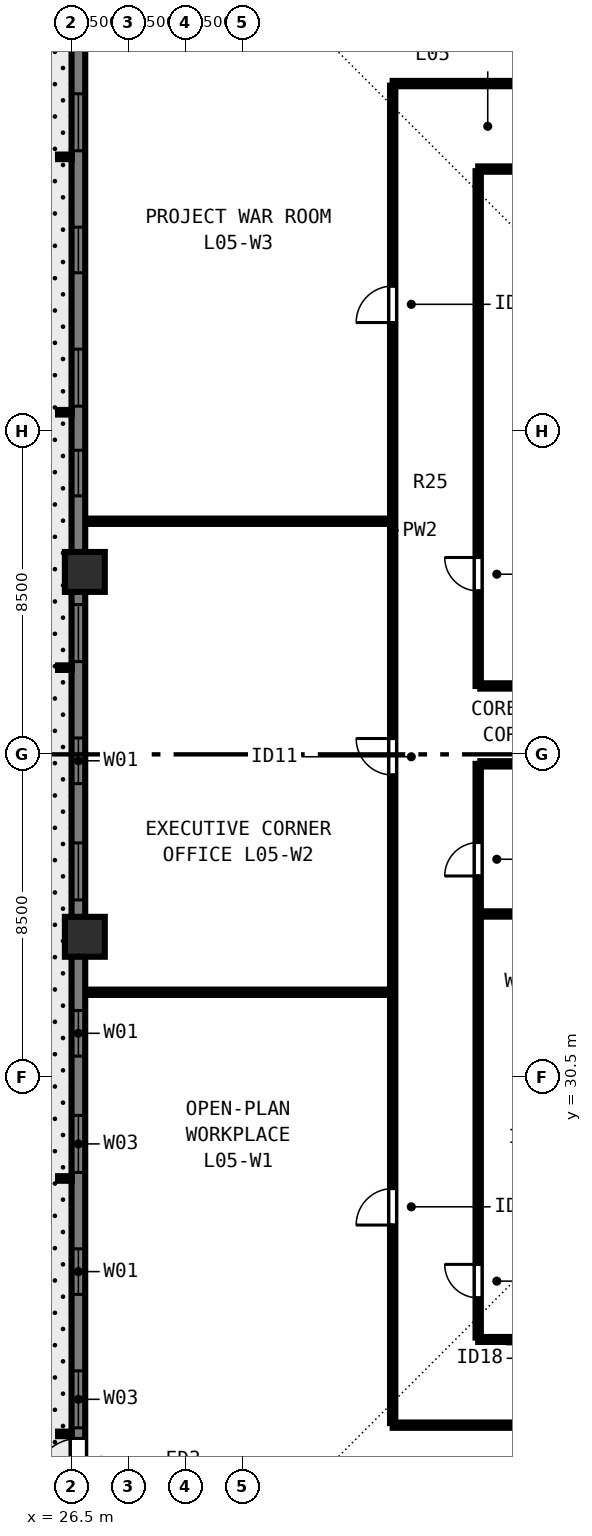
"""IFC4 building model, lengths in metres.
Left out: names, types, materials, properties, quantities, classifications, styles, units other than length and angle.
Written with IfcOpenShell. Run it as: python <this file> out.ifc"""

import sys

from ifc_helpers import new_model, si_unit, direction, frame, frame_2d, origin, origin_2d, place, context, subcontext, project, spatial, rectangle, extrude, element, fill, save


model = new_model("IFC4")
c1 = context("Model", 3, precision=1e-05, world=origin(), true_north=direction((0.0, 1.0)))
c2 = subcontext(c1, "Body", "Model", "MODEL_VIEW")
j1 = project(units=[si_unit("LENGTHUNIT", "METRE"), si_unit("PLANEANGLEUNIT", "RADIAN")], contexts=[c1])
p1 = place(None, origin())
s1 = spatial("IfcSite", under=j1, at=p1, CompositionType="ELEMENT")
p2 = place(p1, origin())
s2 = spatial("IfcBuilding", under=s1, at=p2, CompositionType="ELEMENT")
p3 = place(p2, frame((0.0, 0.0, 23.5)))
s3 = spatial("IfcBuildingStorey", under=s2, at=p3, CompositionType="ELEMENT", Elevation=23.5)
for number, where, z_axis, x_axis in (
    (1, (26.85, 43.8, 0.0), (0.0, 0.0, 1.0), (0.0, 1.0, 0.0)),
    (2, (26.85, 34.2, 0.0), (0.0, 0.0, 1.0), (0.0, 1.0, 0.0)),
):
    element("IfcColumn", number, at=place(p3, frame(where, z_axis=z_axis, x_axis=x_axis)), inside=s3, PredefinedType="COLUMN", context=c2, shape_type="SweptSolid", body=[
        extrude(rectangle(XDim=1.05, YDim=1.05, at=origin_2d()), origin(), (0.0, 0.0, 1.0), 3.5),
    ])
p4 = place(p3, frame((26.68, 16.5, 0.0), z_axis=(0.0, 0.0, 1.0), x_axis=(0.0, 1.0, 0.0)))
e3 = element("IfcWall", 3, at=p4, inside=s3, PredefinedType="SOLIDWALL", context=c2, shape_type="SweptSolid", body=[
    extrude(rectangle(XDim=44.662, YDim=0.36, at=frame_2d((22.331, 0.0))), origin(), (0.0, 0.0, 1.0), 3.28),
])
p5 = place(p4, frame((4.78, 0.0, 0.8)))
e4 = element("IfcOpeningElement", 4, at=p5, cuts=e3, PredefinedType="OPENING", context=c2, shape_type="SweptSolid", body=[
    extrude(rectangle(XDim=1.5, YDim=1.544, at=frame_2d((0.75, 0.772))), frame((0.0, 0.19, 0.0), z_axis=(0.0, -1.0, 0.0), x_axis=(1.0, 0.0, 0.0)), (0.0, 0.0, 1.0), 0.38),
])
p6 = place(p4, frame((8.29, 0.0, 0.8)))
e5 = element("IfcOpeningElement", 5, at=p6, cuts=e3, PredefinedType="OPENING", context=c2, shape_type="SweptSolid", body=[
    extrude(rectangle(XDim=1.2, YDim=1.544, at=frame_2d((0.6, 0.772))), frame((0.0, 0.19, 0.0), z_axis=(0.0, -1.0, 0.0), x_axis=(1.0, 0.0, 0.0)), (0.0, 0.0, 1.0), 0.38),
])
p7 = place(p4, frame((11.5, 0.0, 0.8)))
e6 = element("IfcOpeningElement", 6, at=p7, cuts=e3, PredefinedType="OPENING", context=c2, shape_type="SweptSolid", body=[
    extrude(rectangle(XDim=1.5, YDim=1.544, at=frame_2d((0.75, 0.772))), frame((0.0, 0.19, 0.0), z_axis=(0.0, -1.0, 0.0), x_axis=(1.0, 0.0, 0.0)), (0.0, 0.0, 1.0), 0.38),
])
p8 = place(p4, frame((14.561, 0.0, 0.8)))
e7 = element("IfcOpeningElement", 7, at=p8, cuts=e3, PredefinedType="OPENING", context=c2, shape_type="SweptSolid", body=[
    extrude(rectangle(XDim=1.2, YDim=1.544, at=frame_2d((0.6, 0.772))), frame((0.0, 0.19, 0.0), z_axis=(0.0, -1.0, 0.0), x_axis=(1.0, 0.0, 0.0)), (0.0, 0.0, 1.0), 0.38),
])
p9 = place(p4, frame((18.671, 0.0, 0.8)))
e8 = element("IfcOpeningElement", 8, at=p9, cuts=e3, PredefinedType="OPENING", context=c2, shape_type="SweptSolid", body=[
    extrude(rectangle(XDim=1.5, YDim=1.544, at=frame_2d((0.75, 0.772))), frame((0.0, 0.19, 0.0), z_axis=(0.0, -1.0, 0.0), x_axis=(1.0, 0.0, 0.0)), (0.0, 0.0, 1.0), 0.38),
])
p10 = place(p4, frame((21.731, 0.0, 0.8)))
e9 = element("IfcOpeningElement", 9, at=p10, cuts=e3, PredefinedType="OPENING", context=c2, shape_type="SweptSolid", body=[
    extrude(rectangle(XDim=1.2, YDim=1.544, at=frame_2d((0.6, 0.772))), frame((0.0, 0.19, 0.0), z_axis=(0.0, -1.0, 0.0), x_axis=(1.0, 0.0, 0.0)), (0.0, 0.0, 1.0), 0.38),
])
p11 = place(p4, frame((24.941, 0.0, 0.8)))
e10 = element("IfcOpeningElement", 10, at=p11, cuts=e3, PredefinedType="OPENING", context=c2, shape_type="SweptSolid", body=[
    extrude(rectangle(XDim=1.5, YDim=1.544, at=frame_2d((0.75, 0.772))), frame((0.0, 0.19, 0.0), z_axis=(0.0, -1.0, 0.0), x_axis=(1.0, 0.0, 0.0)), (0.0, 0.0, 1.0), 0.38),
])
p12 = place(p4, frame((29.302, 0.0, 0.8)))
e11 = element("IfcOpeningElement", 11, at=p12, cuts=e3, PredefinedType="OPENING", context=c2, shape_type="SweptSolid", body=[
    extrude(rectangle(XDim=1.2, YDim=1.544, at=frame_2d((0.6, 0.772))), frame((0.0, 0.19, 0.0), z_axis=(0.0, -1.0, 0.0), x_axis=(1.0, 0.0, 0.0)), (0.0, 0.0, 1.0), 0.38),
])
p13 = place(p4, frame((31.662, 0.0, 0.8)))
e12 = element("IfcOpeningElement", 12, at=p13, cuts=e3, PredefinedType="OPENING", context=c2, shape_type="SweptSolid", body=[
    extrude(rectangle(XDim=1.5, YDim=1.544, at=frame_2d((0.75, 0.772))), frame((0.0, 0.19, 0.0), z_axis=(0.0, -1.0, 0.0), x_axis=(1.0, 0.0, 0.0)), (0.0, 0.0, 1.0), 0.38),
])
p14 = place(p4, frame((35.172, 0.0, 0.8)))
e13 = element("IfcOpeningElement", 13, at=p14, cuts=e3, PredefinedType="OPENING", context=c2, shape_type="SweptSolid", body=[
    extrude(rectangle(XDim=1.2, YDim=1.544, at=frame_2d((0.6, 0.772))), frame((0.0, 0.19, 0.0), z_axis=(0.0, -1.0, 0.0), x_axis=(1.0, 0.0, 0.0)), (0.0, 0.0, 1.0), 0.38),
])
p15 = place(p4, frame((38.382, 0.0, 0.8)))
e14 = element("IfcOpeningElement", 14, at=p15, cuts=e3, PredefinedType="OPENING", context=c2, shape_type="SweptSolid", body=[
    extrude(rectangle(XDim=1.5, YDim=1.544, at=frame_2d((0.75, 0.772))), frame((0.0, 0.19, 0.0), z_axis=(0.0, -1.0, 0.0), x_axis=(1.0, 0.0, 0.0)), (0.0, 0.0, 1.0), 0.38),
])
p16 = place(p4, frame((3.35, 0.0, 0.0)))
e15 = element("IfcOpeningElement", 15, at=p16, cuts=e3, PredefinedType="OPENING", context=c2, shape_type="SweptSolid", body=[
    extrude(rectangle(XDim=1.15, YDim=2.15, at=frame_2d((0.575, 1.075))), frame((0.0, 0.19, 0.0), z_axis=(0.0, -1.0, 0.0), x_axis=(1.0, 0.0, 0.0)), (0.0, 0.0, 1.0), 0.38),
])
p17 = place(p3, frame((34.95, 21.35, 0.0), z_axis=(0.0, 0.0, 1.0), x_axis=(1.0, 0.0, 0.0)))
e16 = element("IfcWall", 16, at=p17, inside=s3, PredefinedType="PARTITIONING", context=c2, shape_type="SweptSolid", body=[
    extrude(rectangle(XDim=34.1, YDim=0.14, at=frame_2d((17.05, 0.0))), origin(), (0.0, 0.0, 1.0), 3.28),
])
p18 = place(p17, frame((3.938, 0.0, 0.0)))
e17 = element("IfcOpeningElement", 17, at=p18, cuts=e16, PredefinedType="OPENING", context=c2, shape_type="SweptSolid", body=[
    extrude(rectangle(XDim=0.96, YDim=2.12, at=frame_2d((0.48, 1.06))), frame((0.0, 0.08, 0.0), z_axis=(0.0, -1.0, 0.0), x_axis=(1.0, 0.0, 0.0)), (0.0, 0.0, 1.0), 0.16),
])
p19 = place(p17, frame((28.617, 0.0, 0.0)))
e18 = element("IfcOpeningElement", 18, at=p19, cuts=e16, PredefinedType="OPENING", context=c2, shape_type="SweptSolid", body=[
    extrude(rectangle(XDim=0.96, YDim=2.12, at=frame_2d((0.48, 1.06))), frame((0.0, 0.08, 0.0), z_axis=(0.0, -1.0, 0.0), x_axis=(1.0, 0.0, 0.0)), (0.0, 0.0, 1.0), 0.16),
])
p20 = place(p3, frame((34.95, 56.65, 0.0), z_axis=(0.0, 0.0, 1.0), x_axis=(1.0, 0.0, 0.0)))
e19 = element("IfcWall", 19, at=p20, inside=s3, PredefinedType="PARTITIONING", context=c2, shape_type="SweptSolid", body=[
    extrude(rectangle(XDim=34.1, YDim=0.14, at=frame_2d((17.05, 0.0))), origin(), (0.0, 0.0, 1.0), 3.28),
])
p21 = place(p20, frame((4.522, 0.0, 0.0)))
e20 = element("IfcOpeningElement", 20, at=p21, cuts=e19, PredefinedType="OPENING", context=c2, shape_type="SweptSolid", body=[
    extrude(rectangle(XDim=0.96, YDim=2.12, at=frame_2d((0.48, 1.06))), frame((0.0, 0.08, 0.0), z_axis=(0.0, -1.0, 0.0), x_axis=(1.0, 0.0, 0.0)), (0.0, 0.0, 1.0), 0.16),
])
p22 = place(p20, frame((29.202, 0.0, 0.0)))
e21 = element("IfcOpeningElement", 21, at=p22, cuts=e19, PredefinedType="OPENING", context=c2, shape_type="SweptSolid", body=[
    extrude(rectangle(XDim=0.96, YDim=2.12, at=frame_2d((0.48, 1.06))), frame((0.0, 0.08, 0.0), z_axis=(0.0, -1.0, 0.0), x_axis=(1.0, 0.0, 0.0)), (0.0, 0.0, 1.0), 0.16),
])
p23 = place(p3, frame((34.95, 21.405, 0.0), z_axis=(0.0, 0.0, 1.0), x_axis=(0.0, 1.0, 0.0)))
e22 = element("IfcWall", 22, at=p23, inside=s3, PredefinedType="PARTITIONING", context=c2, shape_type="SweptSolid", body=[
    extrude(rectangle(XDim=35.19, YDim=0.14, at=frame_2d((17.595, 0.0))), origin(), (0.0, 0.0, 1.0), 3.28),
])
p24 = place(p23, frame((5.21, 0.0, 0.0)))
e23 = element("IfcOpeningElement", 23, at=p24, cuts=e22, PredefinedType="OPENING", context=c2, shape_type="SweptSolid", body=[
    extrude(rectangle(XDim=0.96, YDim=2.12, at=frame_2d((0.48, 1.06))), frame((0.0, 0.08, 0.0), z_axis=(0.0, -1.0, 0.0), x_axis=(1.0, 0.0, 0.0)), (0.0, 0.0, 1.0), 0.16),
])
p25 = place(p23, frame((17.052, 0.0, 0.0)))
e24 = element("IfcOpeningElement", 24, at=p25, cuts=e22, PredefinedType="OPENING", context=c2, shape_type="SweptSolid", body=[
    extrude(rectangle(XDim=0.96, YDim=2.12, at=frame_2d((0.48, 1.06))), frame((0.0, 0.08, 0.0), z_axis=(0.0, -1.0, 0.0), x_axis=(1.0, 0.0, 0.0)), (0.0, 0.0, 1.0), 0.16),
])
p26 = place(p23, frame((28.957, 0.0, 0.0)))
e25 = element("IfcOpeningElement", 25, at=p26, cuts=e22, PredefinedType="OPENING", context=c2, shape_type="SweptSolid", body=[
    extrude(rectangle(XDim=0.96, YDim=2.12, at=frame_2d((0.48, 1.06))), frame((0.0, 0.08, 0.0), z_axis=(0.0, -1.0, 0.0), x_axis=(1.0, 0.0, 0.0)), (0.0, 0.0, 1.0), 0.16),
])
p27 = place(p3, frame((37.2, 23.6, 0.0), z_axis=(0.0, 0.0, 1.0), x_axis=(1.0, 0.0, 0.0)))
e26 = element("IfcWall", 26, at=p27, inside=s3, PredefinedType="PARTITIONING", context=c2, shape_type="SweptSolid", body=[
    extrude(rectangle(XDim=29.6, YDim=0.14, at=frame_2d((14.8, 0.0))), origin(), (0.0, 0.0, 1.0), 3.28),
])
p28 = place(p27, frame((1.2, 0.0, 0.0)))
e27 = element("IfcOpeningElement", 27, at=p28, cuts=e26, PredefinedType="OPENING", context=c2, shape_type="SweptSolid", body=[
    extrude(rectangle(XDim=0.88, YDim=2.1, at=frame_2d((0.44, 1.05))), frame((0.0, 0.08, 0.0), z_axis=(0.0, -1.0, 0.0), x_axis=(1.0, 0.0, 0.0)), (0.0, 0.0, 1.0), 0.16),
])
p29 = place(p27, frame((11.3, 0.0, 0.0)))
e28 = element("IfcOpeningElement", 28, at=p29, cuts=e26, PredefinedType="OPENING", context=c2, shape_type="SweptSolid", body=[
    extrude(rectangle(XDim=0.88, YDim=2.1, at=frame_2d((0.44, 1.05))), frame((0.0, 0.08, 0.0), z_axis=(0.0, -1.0, 0.0), x_axis=(1.0, 0.0, 0.0)), (0.0, 0.0, 1.0), 0.16),
])
p30 = place(p27, frame((21.8, 0.0, 0.0)))
e29 = element("IfcOpeningElement", 29, at=p30, cuts=e26, PredefinedType="OPENING", context=c2, shape_type="SweptSolid", body=[
    extrude(rectangle(XDim=0.88, YDim=2.1, at=frame_2d((0.44, 1.05))), frame((0.0, 0.08, 0.0), z_axis=(0.0, -1.0, 0.0), x_axis=(1.0, 0.0, 0.0)), (0.0, 0.0, 1.0), 0.16),
])
p31 = place(p3, frame((37.2, 54.4, 0.0), z_axis=(0.0, 0.0, 1.0), x_axis=(1.0, 0.0, 0.0)))
e30 = element("IfcWall", 30, at=p31, inside=s3, PredefinedType="PARTITIONING", context=c2, shape_type="SweptSolid", body=[
    extrude(rectangle(XDim=29.6, YDim=0.14, at=frame_2d((14.8, 0.0))), origin(), (0.0, 0.0, 1.0), 3.28),
])
p32 = place(p31, frame((2.2, 0.0, 0.0)))
e31 = element("IfcOpeningElement", 31, at=p32, cuts=e30, PredefinedType="OPENING", context=c2, shape_type="SweptSolid", body=[
    extrude(rectangle(XDim=0.88, YDim=2.1, at=frame_2d((0.44, 1.05))), frame((0.0, 0.08, 0.0), z_axis=(0.0, -1.0, 0.0), x_axis=(1.0, 0.0, 0.0)), (0.0, 0.0, 1.0), 0.16),
])
p33 = place(p31, frame((15.3, 0.0, 0.0)))
e32 = element("IfcOpeningElement", 32, at=p33, cuts=e30, PredefinedType="OPENING", context=c2, shape_type="SweptSolid", body=[
    extrude(rectangle(XDim=0.88, YDim=2.1, at=frame_2d((0.44, 1.05))), frame((0.0, 0.08, 0.0), z_axis=(0.0, -1.0, 0.0), x_axis=(1.0, 0.0, 0.0)), (0.0, 0.0, 1.0), 0.16),
])
p34 = place(p31, frame((24.8, 0.0, 0.0)))
e33 = element("IfcOpeningElement", 33, at=p34, cuts=e30, PredefinedType="OPENING", context=c2, shape_type="SweptSolid", body=[
    extrude(rectangle(XDim=0.88, YDim=2.1, at=frame_2d((0.44, 1.05))), frame((0.0, 0.08, 0.0), z_axis=(0.0, -1.0, 0.0), x_axis=(1.0, 0.0, 0.0)), (0.0, 0.0, 1.0), 0.16),
])
p35 = place(p3, frame((37.2, 23.655, 0.0), z_axis=(0.0, 0.0, 1.0), x_axis=(0.0, 1.0, 0.0)))
e34 = element("IfcWall", 34, at=p35, inside=s3, PredefinedType="PARTITIONING", context=c2, shape_type="SweptSolid", body=[
    extrude(rectangle(XDim=15.095, YDim=0.14, at=frame_2d((7.547, 0.0))), origin(), (0.0, 0.0, 1.0), 3.28),
])
p36 = place(p35, frame((1.045, 0.0, 0.0)))
e35 = element("IfcOpeningElement", 35, at=p36, cuts=e34, PredefinedType="OPENING", context=c2, shape_type="SweptSolid", body=[
    extrude(rectangle(XDim=0.88, YDim=2.1, at=frame_2d((0.44, 1.05))), frame((0.0, 0.08, 0.0), z_axis=(0.0, -1.0, 0.0), x_axis=(1.0, 0.0, 0.0)), (0.0, 0.0, 1.0), 0.16),
])
p37 = place(p35, frame((12.145, 0.0, 0.0)))
e36 = element("IfcOpeningElement", 36, at=p37, cuts=e34, PredefinedType="OPENING", context=c2, shape_type="SweptSolid", body=[
    extrude(rectangle(XDim=0.88, YDim=2.1, at=frame_2d((0.44, 1.05))), frame((0.0, 0.08, 0.0), z_axis=(0.0, -1.0, 0.0), x_axis=(1.0, 0.0, 0.0)), (0.0, 0.0, 1.0), 0.16),
])
p38 = place(p3, frame((37.2, 40.8, 0.0), z_axis=(0.0, 0.0, 1.0), x_axis=(0.0, 1.0, 0.0)))
e37 = element("IfcWall", 37, at=p38, inside=s3, PredefinedType="PARTITIONING", context=c2, shape_type="SweptSolid", body=[
    extrude(rectangle(XDim=13.545, YDim=0.14, at=frame_2d((6.772, 0.0))), origin(), (0.0, 0.0, 1.0), 3.28),
])
p39 = place(p38, frame((2.5, 0.0, 0.0)))
e38 = element("IfcOpeningElement", 38, at=p39, cuts=e37, PredefinedType="OPENING", context=c2, shape_type="SweptSolid", body=[
    extrude(rectangle(XDim=0.88, YDim=2.1, at=frame_2d((0.44, 1.05))), frame((0.0, 0.08, 0.0), z_axis=(0.0, -1.0, 0.0), x_axis=(1.0, 0.0, 0.0)), (0.0, 0.0, 1.0), 0.16),
])
for number, where, z_axis, x_axis in (
    (39, (37.255, 38.75, 0.0), (0.0, 0.0, 1.0), (1.0, 0.0, 0.0)),
    (40, (37.255, 40.8, 0.0), (0.0, 0.0, 1.0), (1.0, 0.0, 0.0)),
    (41, (37.255, 34.8, 0.0), (0.0, 0.0, 1.0), (1.0, 0.0, 0.0)),
):
    element("IfcWall", number, at=place(p3, frame(where, z_axis=z_axis, x_axis=x_axis)), inside=s3, PredefinedType="PARTITIONING", context=c2, shape_type="SweptSolid", body=[
        extrude(rectangle(XDim=5.985, YDim=0.14, at=frame_2d((2.993, 0.0))), origin(), (0.0, 0.0, 1.0), 3.28),
    ])
for number, where, z_axis, x_axis in (
    (42, (26.92, 32.74, 0.0), (0.0, 0.0, 1.0), (1.0, 0.0, 0.0)),
    (43, (26.92, 45.134, 0.0), (0.0, 0.0, 1.0), (1.0, 0.0, 0.0)),
):
    element("IfcWall", number, at=place(p3, frame(where, z_axis=z_axis, x_axis=x_axis)), inside=s3, PredefinedType="PARTITIONING", context=c2, shape_type="SweptSolid", body=[
        extrude(rectangle(XDim=7.93, YDim=0.14, at=frame_2d((3.965, 0.0))), origin(), (0.0, 0.0, 1.0), 2.439),
    ])
p40 = place(p5, origin())
e44 = element("IfcWindow", 44, at=p40, inside=s3, PartitioningType="SINGLE_PANEL", PredefinedType="WINDOW", context=c2, shape_type="SweptSolid", body=[
    extrude(rectangle(XDim=1.5, YDim=1.544, at=frame_2d((0.75, 0.772))), frame((0.0, -0.05, 0.0), z_axis=(0.0, -1.0, 0.0), x_axis=(1.0, 0.0, 0.0)), (0.0, 0.0, 1.0), 0.06),
])
fill(e4, e44)
p41 = place(p6, origin())
e45 = element("IfcWindow", 45, at=p41, inside=s3, PartitioningType="SINGLE_PANEL", PredefinedType="WINDOW", context=c2, shape_type="SweptSolid", body=[
    extrude(rectangle(XDim=1.2, YDim=1.544, at=frame_2d((0.6, 0.772))), frame((0.0, -0.05, 0.0), z_axis=(0.0, -1.0, 0.0), x_axis=(1.0, 0.0, 0.0)), (0.0, 0.0, 1.0), 0.06),
])
fill(e5, e45)
p42 = place(p7, origin())
e46 = element("IfcWindow", 46, at=p42, inside=s3, PartitioningType="SINGLE_PANEL", PredefinedType="WINDOW", context=c2, shape_type="SweptSolid", body=[
    extrude(rectangle(XDim=1.5, YDim=1.544, at=frame_2d((0.75, 0.772))), frame((0.0, -0.05, 0.0), z_axis=(0.0, -1.0, 0.0), x_axis=(1.0, 0.0, 0.0)), (0.0, 0.0, 1.0), 0.06),
])
fill(e6, e46)
p43 = place(p8, origin())
e47 = element("IfcWindow", 47, at=p43, inside=s3, PartitioningType="SINGLE_PANEL", PredefinedType="WINDOW", context=c2, shape_type="SweptSolid", body=[
    extrude(rectangle(XDim=1.2, YDim=1.544, at=frame_2d((0.6, 0.772))), frame((0.0, -0.05, 0.0), z_axis=(0.0, -1.0, 0.0), x_axis=(1.0, 0.0, 0.0)), (0.0, 0.0, 1.0), 0.06),
])
fill(e7, e47)
p44 = place(p9, origin())
e48 = element("IfcWindow", 48, at=p44, inside=s3, PartitioningType="SINGLE_PANEL", PredefinedType="WINDOW", context=c2, shape_type="SweptSolid", body=[
    extrude(rectangle(XDim=1.5, YDim=1.544, at=frame_2d((0.75, 0.772))), frame((0.0, -0.05, 0.0), z_axis=(0.0, -1.0, 0.0), x_axis=(1.0, 0.0, 0.0)), (0.0, 0.0, 1.0), 0.06),
])
fill(e8, e48)
p45 = place(p10, origin())
e49 = element("IfcWindow", 49, at=p45, inside=s3, PartitioningType="SINGLE_PANEL", PredefinedType="WINDOW", context=c2, shape_type="SweptSolid", body=[
    extrude(rectangle(XDim=1.2, YDim=1.544, at=frame_2d((0.6, 0.772))), frame((0.0, -0.05, 0.0), z_axis=(0.0, -1.0, 0.0), x_axis=(1.0, 0.0, 0.0)), (0.0, 0.0, 1.0), 0.06),
])
fill(e9, e49)
p46 = place(p11, origin())
e50 = element("IfcWindow", 50, at=p46, inside=s3, PartitioningType="SINGLE_PANEL", PredefinedType="WINDOW", context=c2, shape_type="SweptSolid", body=[
    extrude(rectangle(XDim=1.5, YDim=1.544, at=frame_2d((0.75, 0.772))), frame((0.0, -0.05, 0.0), z_axis=(0.0, -1.0, 0.0), x_axis=(1.0, 0.0, 0.0)), (0.0, 0.0, 1.0), 0.06),
])
fill(e10, e50)
p47 = place(p12, origin())
e51 = element("IfcWindow", 51, at=p47, inside=s3, PartitioningType="SINGLE_PANEL", PredefinedType="WINDOW", context=c2, shape_type="SweptSolid", body=[
    extrude(rectangle(XDim=1.2, YDim=1.544, at=frame_2d((0.6, 0.772))), frame((0.0, -0.05, 0.0), z_axis=(0.0, -1.0, 0.0), x_axis=(1.0, 0.0, 0.0)), (0.0, 0.0, 1.0), 0.06),
])
fill(e11, e51)
p48 = place(p13, origin())
e52 = element("IfcWindow", 52, at=p48, inside=s3, PartitioningType="SINGLE_PANEL", PredefinedType="WINDOW", context=c2, shape_type="SweptSolid", body=[
    extrude(rectangle(XDim=1.5, YDim=1.544, at=frame_2d((0.75, 0.772))), frame((0.0, -0.05, 0.0), z_axis=(0.0, -1.0, 0.0), x_axis=(1.0, 0.0, 0.0)), (0.0, 0.0, 1.0), 0.06),
])
fill(e12, e52)
p49 = place(p14, origin())
e53 = element("IfcWindow", 53, at=p49, inside=s3, PartitioningType="SINGLE_PANEL", PredefinedType="WINDOW", context=c2, shape_type="SweptSolid", body=[
    extrude(rectangle(XDim=1.2, YDim=1.544, at=frame_2d((0.6, 0.772))), frame((0.0, -0.05, 0.0), z_axis=(0.0, -1.0, 0.0), x_axis=(1.0, 0.0, 0.0)), (0.0, 0.0, 1.0), 0.06),
])
fill(e13, e53)
p50 = place(p15, origin())
e54 = element("IfcWindow", 54, at=p50, inside=s3, PartitioningType="SINGLE_PANEL", PredefinedType="WINDOW", context=c2, shape_type="SweptSolid", body=[
    extrude(rectangle(XDim=1.5, YDim=1.544, at=frame_2d((0.75, 0.772))), frame((0.0, -0.05, 0.0), z_axis=(0.0, -1.0, 0.0), x_axis=(1.0, 0.0, 0.0)), (0.0, 0.0, 1.0), 0.06),
])
fill(e14, e54)
p51 = place(p16, origin())
e55 = element("IfcDoor", 55, at=p51, inside=s3, OperationType="SINGLE_SWING_LEFT", PredefinedType="DOOR", context=c2, shape_type="SweptSolid", body=[
    extrude(rectangle(XDim=1.15, YDim=2.15, at=frame_2d((0.575, 1.075))), frame((0.0, 0.025, 0.0), z_axis=(0.0, -1.0, 0.0), x_axis=(1.0, 0.0, 0.0)), (0.0, 0.0, 1.0), 0.05),
])
fill(e15, e55)
p52 = place(p36, origin())
e56 = element("IfcDoor", 56, at=p52, inside=s3, OperationType="SINGLE_SWING_RIGHT", PredefinedType="DOOR", context=c2, shape_type="SweptSolid", body=[
    extrude(rectangle(XDim=0.88, YDim=2.1, at=frame_2d((0.44, 1.05))), frame((0.0, 0.025, 0.0), z_axis=(0.0, -1.0, 0.0), x_axis=(1.0, 0.0, 0.0)), (0.0, 0.0, 1.0), 0.05),
])
fill(e35, e56)
p53 = place(p37, origin())
e57 = element("IfcDoor", 57, at=p53, inside=s3, OperationType="SINGLE_SWING_LEFT", PredefinedType="DOOR", context=c2, shape_type="SweptSolid", body=[
    extrude(rectangle(XDim=0.88, YDim=2.1, at=frame_2d((0.44, 1.05))), frame((0.0, 0.025, 0.0), z_axis=(0.0, -1.0, 0.0), x_axis=(1.0, 0.0, 0.0)), (0.0, 0.0, 1.0), 0.05),
])
fill(e36, e57)
p54 = place(p39, origin())
e58 = element("IfcDoor", 58, at=p54, inside=s3, OperationType="SINGLE_SWING_RIGHT", PredefinedType="DOOR", context=c2, shape_type="SweptSolid", body=[
    extrude(rectangle(XDim=0.88, YDim=2.1, at=frame_2d((0.44, 1.05))), frame((0.0, 0.025, 0.0), z_axis=(0.0, -1.0, 0.0), x_axis=(1.0, 0.0, 0.0)), (0.0, 0.0, 1.0), 0.05),
])
fill(e38, e58)
p55 = place(p24, origin())
e59 = element("IfcDoor", 59, at=p55, inside=s3, OperationType="SINGLE_SWING_LEFT", PredefinedType="DOOR", context=c2, shape_type="SweptSolid", body=[
    extrude(rectangle(XDim=0.96, YDim=2.12, at=frame_2d((0.48, 1.06))), frame((0.0, 0.025, 0.0), z_axis=(0.0, -1.0, 0.0), x_axis=(1.0, 0.0, 0.0)), (0.0, 0.0, 1.0), 0.05),
])
fill(e23, e59)
p56 = place(p25, origin())
e60 = element("IfcDoor", 60, at=p56, inside=s3, OperationType="SINGLE_SWING_RIGHT", PredefinedType="DOOR", context=c2, shape_type="SweptSolid", body=[
    extrude(rectangle(XDim=0.96, YDim=2.12, at=frame_2d((0.48, 1.06))), frame((0.0, 0.025, 0.0), z_axis=(0.0, -1.0, 0.0), x_axis=(1.0, 0.0, 0.0)), (0.0, 0.0, 1.0), 0.05),
])
fill(e24, e60)
p57 = place(p26, origin())
e61 = element("IfcDoor", 61, at=p57, inside=s3, OperationType="SINGLE_SWING_LEFT", PredefinedType="DOOR", context=c2, shape_type="SweptSolid", body=[
    extrude(rectangle(XDim=0.96, YDim=2.12, at=frame_2d((0.48, 1.06))), frame((0.0, 0.025, 0.0), z_axis=(0.0, -1.0, 0.0), x_axis=(1.0, 0.0, 0.0)), (0.0, 0.0, 1.0), 0.05),
])
fill(e25, e61)
save(model, sys.argv[1])
